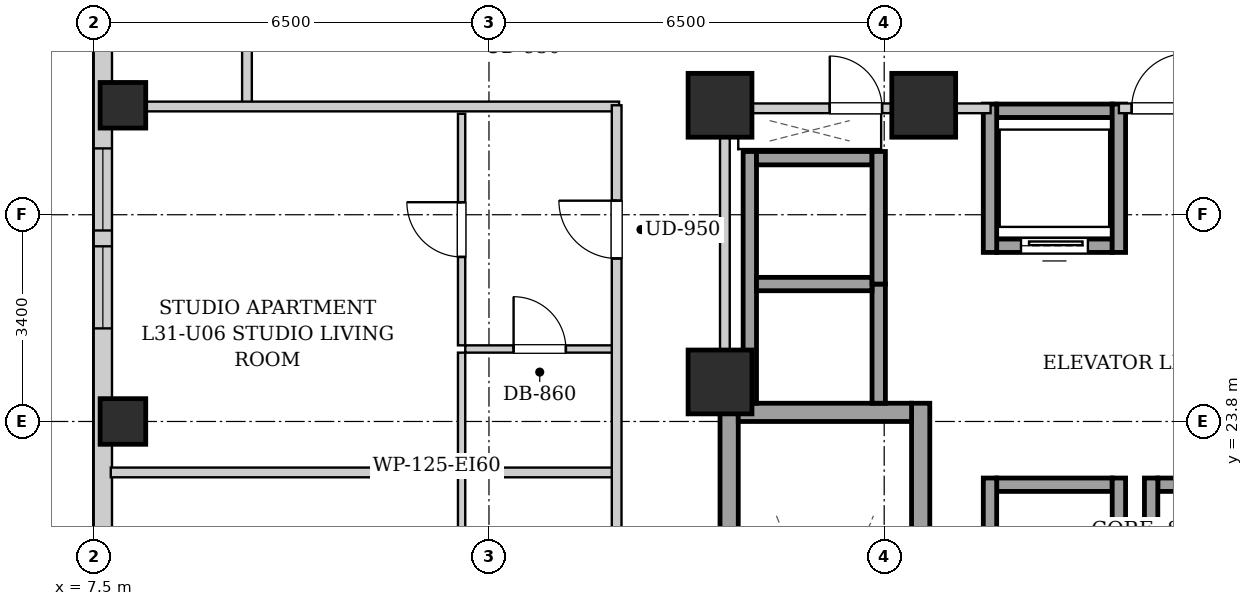
"""IFC4 building model, lengths in metres.
Left out: names, types, materials, properties, quantities, classifications, styles, units other than length and angle.
Written with IfcOpenShell. Run it as: python <this file> out.ifc"""

import sys

from ifc_helpers import new_model, si_unit, direction, frame, frame_2d, origin, origin_2d, place, context, subcontext, project, spatial, rectangle, extrude, element, fill, save


model = new_model("IFC4")
c1 = context("Model", 3, precision=1e-05, world=origin(), true_north=direction((0.0, 1.0)))
c2 = subcontext(c1, "Body", "Model", "MODEL_VIEW")
j1 = project(units=[si_unit("LENGTHUNIT", "METRE"), si_unit("PLANEANGLEUNIT", "RADIAN")], contexts=[c1])
p1 = place(None, origin())
s1 = spatial("IfcSite", under=j1, at=p1, CompositionType="ELEMENT")
p2 = place(p1, origin())
s2 = spatial("IfcBuilding", under=s1, at=p2, CompositionType="ELEMENT")
p3 = place(p2, frame((0.0, 0.0, 110.3)))
s3 = spatial("IfcBuildingStorey", under=s2, at=p3, CompositionType="ELEMENT", Elevation=110.3)
for number, where, z_axis, x_axis in (
    (1, (7.98, 23.8, 0.0), (0.0, 0.0, 1.0), (1.0, 0.0, 0.0)),
    (2, (7.98, 29.0, 0.0), (0.0, 0.0, 1.0), (1.0, 0.0, 0.0)),
):
    element("IfcColumn", number, at=place(p3, frame(where, z_axis=z_axis, x_axis=x_axis)), inside=s3, PredefinedType="COLUMN", context=c2, shape_type="SweptSolid", body=[
        extrude(rectangle(XDim=0.75, YDim=0.75, at=origin_2d()), origin(), (0.0, 0.0, 1.0), 3.2),
    ])
for number, where, z_axis, x_axis in (
    (3, (17.8, 29.0, 0.0), (0.0, 0.0, 1.0), (1.0, 0.0, 0.0)),
    (4, (21.15, 29.0, 0.0), (0.0, 0.0, 1.0), (1.0, 0.0, 0.0)),
    (5, (17.8, 24.45, 0.0), (0.0, 0.0, 1.0), (1.0, 0.0, 0.0)),
):
    element("IfcColumn", number, at=place(p3, frame(where, z_axis=z_axis, x_axis=x_axis)), inside=s3, PredefinedType="COLUMN", context=c2, shape_type="SweptSolid", body=[
        extrude(rectangle(XDim=1.05, YDim=1.05, at=origin_2d()), origin(), (0.0, 0.0, 1.0), 3.2),
    ])
p4 = place(p3, frame((7.65, 2.5, 0.0), z_axis=(0.0, 0.0, 1.0), x_axis=(0.0, 1.0, 0.0)))
e6 = element("IfcWall", 6, at=p4, inside=s3, PredefinedType="SOLIDWALL", context=c2, shape_type="SweptSolid", body=[
    extrude(rectangle(XDim=38.3, YDim=0.3, at=frame_2d((19.15, 0.0))), origin(), (0.0, 0.0, 1.0), 2.94),
])
p5 = place(p4, frame((3.38, 0.0, 0.55)))
e7 = element("IfcOpeningElement", 7, at=p5, cuts=e6, PredefinedType="OPENING", context=c2, shape_type="SweptSolid", body=[
    extrude(rectangle(XDim=1.35, YDim=1.2, at=frame_2d((0.675, 0.6))), frame((0.0, 0.16, 0.0), z_axis=(0.0, -1.0, 0.0), x_axis=(1.0, 0.0, 0.0)), (0.0, 0.0, 1.0), 0.32),
])
p6 = place(p4, frame((1.135, 0.0, 0.55)))
e8 = element("IfcOpeningElement", 8, at=p6, cuts=e6, PredefinedType="OPENING", context=c2, shape_type="SweptSolid", body=[
    extrude(rectangle(XDim=1.35, YDim=1.2, at=frame_2d((0.675, 0.6))), frame((0.0, 0.16, 0.0), z_axis=(0.0, -1.0, 0.0), x_axis=(1.0, 0.0, 0.0)), (0.0, 0.0, 1.0), 0.32),
])
p7 = place(p4, frame((33.946, 0.0, 0.55)))
e9 = element("IfcOpeningElement", 9, at=p7, cuts=e6, PredefinedType="OPENING", context=c2, shape_type="SweptSolid", body=[
    extrude(rectangle(XDim=1.35, YDim=1.2, at=frame_2d((0.675, 0.6))), frame((0.0, 0.16, 0.0), z_axis=(0.0, -1.0, 0.0), x_axis=(1.0, 0.0, 0.0)), (0.0, 0.0, 1.0), 0.32),
])
p8 = place(p4, frame((32.035, 0.0, 0.55)))
e10 = element("IfcOpeningElement", 10, at=p8, cuts=e6, PredefinedType="OPENING", context=c2, shape_type="SweptSolid", body=[
    extrude(rectangle(XDim=1.35, YDim=1.2, at=frame_2d((0.675, 0.6))), frame((0.0, 0.16, 0.0), z_axis=(0.0, -1.0, 0.0), x_axis=(1.0, 0.0, 0.0)), (0.0, 0.0, 1.0), 0.32),
])
p9 = place(p4, frame((15.65, 0.0, 0.55)))
e11 = element("IfcOpeningElement", 11, at=p9, cuts=e6, PredefinedType="OPENING", context=c2, shape_type="SweptSolid", body=[
    extrude(rectangle(XDim=1.35, YDim=1.2, at=frame_2d((0.675, 0.6))), frame((0.0, 0.16, 0.0), z_axis=(0.0, -1.0, 0.0), x_axis=(1.0, 0.0, 0.0)), (0.0, 0.0, 1.0), 0.32),
])
p10 = place(p4, frame((13.035, 0.0, 0.55)))
e12 = element("IfcOpeningElement", 12, at=p10, cuts=e6, PredefinedType="OPENING", context=c2, shape_type="SweptSolid", body=[
    extrude(rectangle(XDim=1.35, YDim=1.2, at=frame_2d((0.675, 0.6))), frame((0.0, 0.16, 0.0), z_axis=(0.0, -1.0, 0.0), x_axis=(1.0, 0.0, 0.0)), (0.0, 0.0, 1.0), 0.32),
])
p11 = place(p4, frame((22.831, 0.0, 0.55)))
e13 = element("IfcOpeningElement", 13, at=p11, cuts=e6, PredefinedType="OPENING", context=c2, shape_type="SweptSolid", body=[
    extrude(rectangle(XDim=1.35, YDim=1.2, at=frame_2d((0.675, 0.6))), frame((0.0, 0.16, 0.0), z_axis=(0.0, -1.0, 0.0), x_axis=(1.0, 0.0, 0.0)), (0.0, 0.0, 1.0), 0.32),
])
p12 = place(p4, frame((24.441, 0.0, 0.55)))
e14 = element("IfcOpeningElement", 14, at=p12, cuts=e6, PredefinedType="OPENING", context=c2, shape_type="SweptSolid", body=[
    extrude(rectangle(XDim=1.35, YDim=1.2, at=frame_2d((0.675, 0.6))), frame((0.0, 0.16, 0.0), z_axis=(0.0, -1.0, 0.0), x_axis=(1.0, 0.0, 0.0)), (0.0, 0.0, 1.0), 0.32),
])
for number, where, z_axis, x_axis in (
    (15, (17.95, 15.1, 0.0), (0.0, 0.0, 1.0), (0.0, 1.0, 0.0)),
    (16, (21.1, 15.1, 0.0), (0.0, 0.0, 1.0), (0.0, 1.0, 0.0)),
):
    element("IfcWall", number, at=place(p3, frame(where, z_axis=z_axis, x_axis=x_axis)), inside=s3, PredefinedType="SHEAR", context=c2, shape_type="SweptSolid", body=[
        extrude(rectangle(XDim=9.0, YDim=0.3, at=frame_2d((4.5, 0.0))), origin(), (0.0, 0.0, 1.0), 2.94),
    ])
p13 = place(p3, frame((18.1, 23.95, 0.0), z_axis=(0.0, 0.0, 1.0), x_axis=(1.0, 0.0, 0.0)))
e17 = element("IfcWall", 17, at=p13, inside=s3, PredefinedType="SHEAR", context=c2, shape_type="SweptSolid", body=[
    extrude(rectangle(XDim=2.85, YDim=0.3, at=frame_2d((1.425, 0.0))), origin(), (0.0, 0.0, 1.0), 2.94),
])
p14 = place(p3, frame((22.35, 26.69, 0.0), z_axis=(0.0, 0.0, 1.0), x_axis=(1.0, 0.0, 0.0)))
e18 = element("IfcWall", 18, at=p14, inside=s3, PredefinedType="SHEAR", context=c2, shape_type="SweptSolid", body=[
    extrude(rectangle(XDim=1.9, YDim=0.22, at=frame_2d((0.95, 0.0))), origin(), (0.0, 0.0, 1.0), 2.94),
])
p15 = place(p14, frame((0.4, 0.0, 0.0)))
e19 = element("IfcOpeningElement", 19, at=p15, cuts=e18, PredefinedType="OPENING", context=c2, shape_type="SweptSolid", body=[
    extrude(rectangle(XDim=1.1, YDim=2.15, at=frame_2d((0.55, 1.075))), frame((0.0, 0.12, 0.0), z_axis=(0.0, -1.0, 0.0), x_axis=(1.0, 0.0, 0.0)), (0.0, 0.0, 1.0), 0.24),
])
p16 = place(p3, frame((22.35, 28.91, 0.0), z_axis=(0.0, 0.0, 1.0), x_axis=(1.0, 0.0, 0.0)))
e20 = element("IfcWall", 20, at=p16, inside=s3, PredefinedType="SHEAR", context=c2, shape_type="SweptSolid", body=[
    extrude(rectangle(XDim=1.9, YDim=0.22, at=frame_2d((0.95, 0.0))), origin(), (0.0, 0.0, 1.0), 2.94),
])
for number, where, z_axis, x_axis in (
    (21, (22.24, 26.58, 0.0), (0.0, 0.0, 1.0), (0.0, 1.0, 0.0)),
    (22, (24.36, 26.58, 0.0), (0.0, 0.0, 1.0), (0.0, 1.0, 0.0)),
):
    element("IfcWall", number, at=place(p3, frame(where, z_axis=z_axis, x_axis=x_axis)), inside=s3, PredefinedType="SHEAR", context=c2, shape_type="SweptSolid", body=[
        extrude(rectangle(XDim=2.44, YDim=0.22, at=frame_2d((1.22, 0.0))), origin(), (0.0, 0.0, 1.0), 2.94),
    ])
p17 = place(p3, frame((22.35, 22.76, 0.0), z_axis=(0.0, 0.0, 1.0), x_axis=(1.0, 0.0, 0.0)))
e23 = element("IfcWall", 23, at=p17, inside=s3, PredefinedType="SHEAR", context=c2, shape_type="SweptSolid", body=[
    extrude(rectangle(XDim=1.9, YDim=0.22, at=frame_2d((0.95, 0.0))), origin(), (0.0, 0.0, 1.0), 2.94),
])
for number, where, z_axis, x_axis in (
    (24, (22.24, 20.43, 0.0), (0.0, 0.0, 1.0), (0.0, 1.0, 0.0)),
    (25, (24.36, 20.43, 0.0), (0.0, 0.0, 1.0), (0.0, 1.0, 0.0)),
):
    element("IfcWall", number, at=place(p3, frame(where, z_axis=z_axis, x_axis=x_axis)), inside=s3, PredefinedType="SHEAR", context=c2, shape_type="SweptSolid", body=[
        extrude(rectangle(XDim=2.44, YDim=0.22, at=frame_2d((1.22, 0.0))), origin(), (0.0, 0.0, 1.0), 2.94),
    ])
p18 = place(p3, frame((25.0, 22.76, 0.0), z_axis=(0.0, 0.0, 1.0), x_axis=(1.0, 0.0, 0.0)))
e26 = element("IfcWall", 26, at=p18, inside=s3, PredefinedType="SHEAR", context=c2, shape_type="SweptSolid", body=[
    extrude(rectangle(XDim=1.9, YDim=0.22, at=frame_2d((0.95, 0.0))), origin(), (0.0, 0.0, 1.0), 2.94),
])
p19 = place(p3, frame((24.89, 20.43, 0.0), z_axis=(0.0, 0.0, 1.0), x_axis=(0.0, 1.0, 0.0)))
e27 = element("IfcWall", 27, at=p19, inside=s3, PredefinedType="SHEAR", context=c2, shape_type="SweptSolid", body=[
    extrude(rectangle(XDim=2.44, YDim=0.22, at=frame_2d((1.22, 0.0))), origin(), (0.0, 0.0, 1.0), 2.94),
])
p20 = place(p3, frame((18.29, 24.1, 0.0), z_axis=(0.0, 0.0, 1.0), x_axis=(0.0, 1.0, 0.0)))
e28 = element("IfcWall", 28, at=p20, inside=s3, PredefinedType="SHEAR", context=c2, shape_type="SweptSolid", body=[
    extrude(rectangle(XDim=4.14, YDim=0.22, at=frame_2d((2.07, 0.0))), origin(), (0.0, 0.0, 1.0), 2.94),
])
p21 = place(p3, frame((20.41, 24.1, 0.0), z_axis=(0.0, 0.0, 1.0), x_axis=(0.0, 1.0, 0.0)))
e29 = element("IfcWall", 29, at=p21, inside=s3, PredefinedType="SHEAR", context=c2, shape_type="SweptSolid", body=[
    extrude(rectangle(XDim=1.96, YDim=0.22, at=frame_2d((0.98, 0.0))), origin(), (0.0, 0.0, 1.0), 2.94),
])
for number, where, z_axis, x_axis in (
    (30, (18.4, 26.06, 0.0), (0.0, 0.0, 1.0), (1.0, 0.0, 0.0)),
    (31, (18.4, 28.13, 0.0), (0.0, 0.0, 1.0), (1.0, 0.0, 0.0)),
):
    element("IfcWall", number, at=place(p3, frame(where, z_axis=z_axis, x_axis=x_axis)), inside=s3, PredefinedType="SHEAR", context=c2, shape_type="SweptSolid", body=[
        extrude(rectangle(XDim=1.9, YDim=0.22, at=frame_2d((0.95, 0.0))), origin(), (0.0, 0.0, 1.0), 2.94),
    ])
p22 = place(p3, frame((20.41, 26.06, 0.0), z_axis=(0.0, 0.0, 1.0), x_axis=(0.0, 1.0, 0.0)))
e32 = element("IfcWall", 32, at=p22, inside=s3, PredefinedType="SHEAR", context=c2, shape_type="SweptSolid", body=[
    extrude(rectangle(XDim=2.18, YDim=0.22, at=frame_2d((1.09, 0.0))), origin(), (0.0, 0.0, 1.0), 2.94),
])
p23 = place(p3, frame((17.88, 24.12, 0.0), z_axis=(0.0, 0.0, 1.0), x_axis=(0.0, 1.0, 0.0)))
e33 = element("IfcWall", 33, at=p23, inside=s3, PredefinedType="PARTITIONING", context=c2, shape_type="SweptSolid", body=[
    extrude(rectangle(XDim=4.76, YDim=0.16, at=frame_2d((2.38, 0.0))), origin(), (0.0, 0.0, 1.0), 2.94),
])
p24 = place(p3, frame((24.36, 28.95, 0.0), z_axis=(0.0, 0.0, 1.0), x_axis=(1.0, 0.0, 0.0)))
e34 = element("IfcWall", 34, at=p24, inside=s3, PredefinedType="PARTITIONING", context=c2, shape_type="SweptSolid", body=[
    extrude(rectangle(XDim=1.32, YDim=0.16, at=frame_2d((0.66, 0.0))), origin(), (0.0, 0.0, 1.0), 2.313),
])
p25 = place(p24, frame((0.21, 0.0, 0.0)))
e35 = element("IfcOpeningElement", 35, at=p25, cuts=e34, PredefinedType="OPENING", context=c2, shape_type="SweptSolid", body=[
    extrude(rectangle(XDim=0.9, YDim=2.05, at=frame_2d((0.45, 1.025))), frame((0.0, 0.09, 0.0), z_axis=(0.0, -1.0, 0.0), x_axis=(1.0, 0.0, 0.0)), (0.0, 0.0, 1.0), 0.18),
])
p26 = place(p3, frame((17.96, 28.95, 0.0), z_axis=(0.0, 0.0, 1.0), x_axis=(1.0, 0.0, 0.0)))
e36 = element("IfcWall", 36, at=p26, inside=s3, PredefinedType="PARTITIONING", context=c2, shape_type="SweptSolid", body=[
    extrude(rectangle(XDim=4.29, YDim=0.16, at=frame_2d((2.145, 0.0))), origin(), (0.0, 0.0, 1.0), 2.313),
])
p27 = place(p26, frame((1.645, 0.0, 0.0)))
e37 = element("IfcOpeningElement", 37, at=p27, cuts=e36, PredefinedType="OPENING", context=c2, shape_type="SweptSolid", body=[
    extrude(rectangle(XDim=0.86, YDim=2.05, at=frame_2d((0.43, 1.025))), frame((0.0, 0.09, 0.0), z_axis=(0.0, -1.0, 0.0), x_axis=(1.0, 0.0, 0.0)), (0.0, 0.0, 1.0), 0.18),
])
p28 = place(p3, frame((10.02, 28.98, 0.0), z_axis=(0.0, 0.0, 1.0), x_axis=(0.0, 1.0, 0.0)))
e38 = element("IfcWall", 38, at=p28, inside=s3, PredefinedType="PARTITIONING", context=c2, shape_type="SweptSolid", body=[
    extrude(rectangle(XDim=1.74, YDim=0.16, at=frame_2d((0.87, 0.0))), origin(), (0.0, 0.0, 1.0), 2.94),
])
p29 = place(p3, frame((7.78, 28.98, 0.0), z_axis=(0.0, 0.0, 1.0), x_axis=(1.0, 0.0, 0.0)))
e39 = element("IfcWall", 39, at=p29, inside=s3, PredefinedType="PARTITIONING", context=c2, shape_type="SweptSolid", body=[
    extrude(rectangle(XDim=8.36, YDim=0.16, at=frame_2d((4.18, 0.0))), origin(), (0.0, 0.0, 1.0), 2.313),
])
p30 = place(p3, frame((7.78, 22.962, 0.0), z_axis=(0.0, 0.0, 1.0), x_axis=(1.0, 0.0, 0.0)))
e40 = element("IfcWall", 40, at=p30, inside=s3, PredefinedType="PARTITIONING", context=c2, shape_type="SweptSolid", body=[
    extrude(rectangle(XDim=8.28, YDim=0.16, at=frame_2d((4.14, 0.0))), origin(), (0.0, 0.0, 1.0), 2.94),
])
p31 = place(p3, frame((13.55, 17.489, 0.0), z_axis=(0.0, 0.0, 1.0), x_axis=(0.0, 1.0, 0.0)))
e41 = element("IfcWall", 41, at=p31, inside=s3, PredefinedType="PARTITIONING", context=c2, shape_type="SweptSolid", body=[
    extrude(rectangle(XDim=5.433, YDim=0.12, at=frame_2d((2.717, 0.0))), origin(), (0.0, 0.0, 1.0), 2.94),
])
p32 = place(p31, frame((2.266, 0.0, 0.0)))
e42 = element("IfcOpeningElement", 42, at=p32, cuts=e41, PredefinedType="OPENING", context=c2, shape_type="SweptSolid", body=[
    extrude(rectangle(XDim=0.9, YDim=2.05, at=frame_2d((0.45, 1.025))), frame((0.0, 0.07, 0.0), z_axis=(0.0, -1.0, 0.0), x_axis=(1.0, 0.0, 0.0)), (0.0, 0.0, 1.0), 0.14),
])
p33 = place(p3, frame((13.61, 24.992, 0.0), z_axis=(0.0, 0.0, 1.0), x_axis=(1.0, 0.0, 0.0)))
e43 = element("IfcWall", 43, at=p33, inside=s3, PredefinedType="PARTITIONING", context=c2, shape_type="SweptSolid", body=[
    extrude(rectangle(XDim=2.45, YDim=0.12, at=frame_2d((1.225, 0.0))), origin(), (0.0, 0.0, 1.0), 2.94),
])
p34 = place(p33, frame((0.795, 0.0, 0.0)))
e44 = element("IfcOpeningElement", 44, at=p34, cuts=e43, PredefinedType="OPENING", context=c2, shape_type="SweptSolid", body=[
    extrude(rectangle(XDim=0.86, YDim=2.05, at=frame_2d((0.43, 1.025))), frame((0.0, 0.07, 0.0), z_axis=(0.0, -1.0, 0.0), x_axis=(1.0, 0.0, 0.0)), (0.0, 0.0, 1.0), 0.14),
])
p35 = place(p3, frame((13.55, 23.082, 0.0), z_axis=(0.0, 0.0, 1.0), x_axis=(0.0, 1.0, 0.0)))
e45 = element("IfcWall", 45, at=p35, inside=s3, PredefinedType="PARTITIONING", context=c2, shape_type="SweptSolid", body=[
    extrude(rectangle(XDim=1.85, YDim=0.12, at=frame_2d((0.925, 0.0))), origin(), (0.0, 0.0, 1.0), 2.94),
])
p36 = place(p3, frame((13.55, 25.052, 0.0), z_axis=(0.0, 0.0, 1.0), x_axis=(0.0, 1.0, 0.0)))
e46 = element("IfcWall", 46, at=p36, inside=s3, PredefinedType="PARTITIONING", context=c2, shape_type="SweptSolid", body=[
    extrude(rectangle(XDim=3.808, YDim=0.12, at=frame_2d((1.904, 0.0))), origin(), (0.0, 0.0, 1.0), 2.94),
])
p37 = place(p36, frame((1.454, 0.0, 0.0)))
e47 = element("IfcOpeningElement", 47, at=p37, cuts=e46, PredefinedType="OPENING", context=c2, shape_type="SweptSolid", body=[
    extrude(rectangle(XDim=0.9, YDim=2.05, at=frame_2d((0.45, 1.025))), frame((0.0, 0.07, 0.0), z_axis=(0.0, -1.0, 0.0), x_axis=(1.0, 0.0, 0.0)), (0.0, 0.0, 1.0), 0.14),
])
p38 = place(p3, frame((16.1, 15.07, 0.0), z_axis=(0.0, 0.0, 1.0), x_axis=(0.0, 1.0, 0.0)))
e48 = element("IfcWall", 48, at=p38, inside=s3, PredefinedType="PARTITIONING", context=c2, shape_type="SweptSolid", body=[
    extrude(rectangle(XDim=13.93, YDim=0.16, at=frame_2d((6.965, 0.0))), origin(), (0.0, 0.0, 1.0), 2.94),
])
p39 = place(p38, frame((4.661, 0.0, 0.0)))
e49 = element("IfcOpeningElement", 49, at=p39, cuts=e48, PredefinedType="OPENING", context=c2, shape_type="SweptSolid", body=[
    extrude(rectangle(XDim=0.95, YDim=2.1, at=frame_2d((0.475, 1.05))), frame((0.0, 0.09, 0.0), z_axis=(0.0, -1.0, 0.0), x_axis=(1.0, 0.0, 0.0)), (0.0, 0.0, 1.0), 0.18),
])
p40 = place(p38, frame((11.411, 0.0, 0.0)))
e50 = element("IfcOpeningElement", 50, at=p40, cuts=e48, PredefinedType="OPENING", context=c2, shape_type="SweptSolid", body=[
    extrude(rectangle(XDim=0.95, YDim=2.1, at=frame_2d((0.475, 1.05))), frame((0.0, 0.09, 0.0), z_axis=(0.0, -1.0, 0.0), x_axis=(1.0, 0.0, 0.0)), (0.0, 0.0, 1.0), 0.18),
])
p41 = place(p15, origin())
e51 = element("IfcDoor", 51, at=p41, inside=s3, OperationType="SLIDING_TO_LEFT", PredefinedType="DOOR", context=c2, shape_type="SweptSolid", body=[
    extrude(rectangle(XDim=1.1, YDim=2.15, at=frame_2d((0.55, 1.075))), frame((0.0, 0.025, 0.0), z_axis=(0.0, -1.0, 0.0), x_axis=(1.0, 0.0, 0.0)), (0.0, 0.0, 1.0), 0.05),
])
fill(e19, e51)
p42 = place(p25, origin())
e52 = element("IfcDoor", 52, at=p42, inside=s3, OperationType="SINGLE_SWING_RIGHT", PredefinedType="DOOR", context=c2, shape_type="SweptSolid", body=[
    extrude(rectangle(XDim=0.9, YDim=2.05, at=frame_2d((0.45, 1.025))), frame((0.0, 0.025, 0.0), z_axis=(0.0, -1.0, 0.0), x_axis=(1.0, 0.0, 0.0)), (0.0, 0.0, 1.0), 0.05),
])
fill(e35, e52)
p43 = place(p27, origin())
e53 = element("IfcDoor", 53, at=p43, inside=s3, OperationType="SINGLE_SWING_LEFT", PredefinedType="DOOR", context=c2, shape_type="SweptSolid", body=[
    extrude(rectangle(XDim=0.86, YDim=2.05, at=frame_2d((0.43, 1.025))), frame((0.0, 0.025, 0.0), z_axis=(0.0, -1.0, 0.0), x_axis=(1.0, 0.0, 0.0)), (0.0, 0.0, 1.0), 0.05),
])
fill(e37, e53)
p44 = place(p34, origin())
e54 = element("IfcDoor", 54, at=p44, inside=s3, OperationType="SINGLE_SWING_LEFT", PredefinedType="DOOR", context=c2, shape_type="SweptSolid", body=[
    extrude(rectangle(XDim=0.86, YDim=2.05, at=frame_2d((0.43, 1.025))), frame((0.0, 0.025, 0.0), z_axis=(0.0, -1.0, 0.0), x_axis=(1.0, 0.0, 0.0)), (0.0, 0.0, 1.0), 0.05),
])
fill(e44, e54)
p45 = place(p37, origin())
e55 = element("IfcDoor", 55, at=p45, inside=s3, OperationType="SINGLE_SWING_RIGHT", PredefinedType="DOOR", context=c2, shape_type="SweptSolid", body=[
    extrude(rectangle(XDim=0.9, YDim=2.05, at=frame_2d((0.45, 1.025))), frame((0.0, 0.025, 0.0), z_axis=(0.0, -1.0, 0.0), x_axis=(1.0, 0.0, 0.0)), (0.0, 0.0, 1.0), 0.05),
])
fill(e47, e55)
p46 = place(p40, origin())
e56 = element("IfcDoor", 56, at=p46, inside=s3, OperationType="SINGLE_SWING_RIGHT", PredefinedType="DOOR", context=c2, shape_type="SweptSolid", body=[
    extrude(rectangle(XDim=0.95, YDim=2.1, at=frame_2d((0.475, 1.05))), frame((0.0, 0.025, 0.0), z_axis=(0.0, -1.0, 0.0), x_axis=(1.0, 0.0, 0.0)), (0.0, 0.0, 1.0), 0.05),
])
fill(e50, e56)
p47 = place(p11, origin())
e57 = element("IfcWindow", 57, at=p47, inside=s3, PartitioningType="SINGLE_PANEL", PredefinedType="WINDOW", context=c2, shape_type="SweptSolid", body=[
    extrude(rectangle(XDim=1.35, YDim=1.2, at=frame_2d((0.675, 0.6))), frame((0.0, 0.03, 0.0), z_axis=(0.0, -1.0, 0.0), x_axis=(1.0, 0.0, 0.0)), (0.0, 0.0, 1.0), 0.06),
])
fill(e13, e57)
p48 = place(p12, origin())
e58 = element("IfcWindow", 58, at=p48, inside=s3, PartitioningType="SINGLE_PANEL", PredefinedType="WINDOW", context=c2, shape_type="SweptSolid", body=[
    extrude(rectangle(XDim=1.35, YDim=1.2, at=frame_2d((0.675, 0.6))), frame((0.0, 0.03, 0.0), z_axis=(0.0, -1.0, 0.0), x_axis=(1.0, 0.0, 0.0)), (0.0, 0.0, 1.0), 0.06),
])
fill(e14, e58)
save(model, sys.argv[1])
